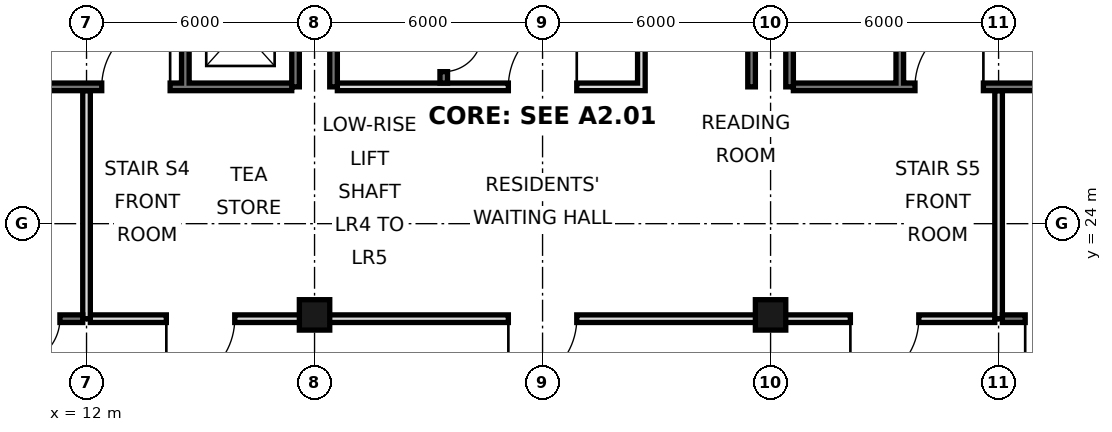
"""IFC4 building model, lengths in metres.
Left out: names, types, materials, properties, quantities, classifications, styles, units other than length and angle.
Written with IfcOpenShell. Run it as: python <this file> out.ifc"""

import sys

from ifc_helpers import new_model, si_unit, direction, frame, frame_2d, origin, origin_2d, place, context, subcontext, project, spatial, rectangle, hollow_rectangle, extrude, element, fill, save


model = new_model("IFC4")
c1 = context("Model", 3, precision=1e-05, world=origin(), true_north=direction((0.0, 1.0)))
c2 = subcontext(c1, "Body", "Model", "MODEL_VIEW")
j1 = project(units=[si_unit("LENGTHUNIT", "METRE"), si_unit("PLANEANGLEUNIT", "RADIAN")], contexts=[c1])
p1 = place(None, origin())
s1 = spatial("IfcSite", under=j1, at=p1, CompositionType="ELEMENT")
p2 = place(p1, origin())
s2 = spatial("IfcBuilding", under=s1, at=p2, CompositionType="ELEMENT")
p3 = place(p2, frame((0.0, 0.0, -13.5)))
s3 = spatial("IfcBuildingStorey", under=s2, at=p3, CompositionType="ELEMENT", Elevation=-13.5)
for number, where, z_axis, x_axis in (
    (1, (18.0, 21.6, 0.0), (0.0, 0.0, 1.0), (1.0, 0.0, 0.0)),
    (2, (30.0, 21.6, 0.0), (0.0, 0.0, 1.0), (1.0, 0.0, 0.0)),
):
    element("IfcColumn", number, at=place(p3, frame(where, z_axis=z_axis, x_axis=x_axis)), inside=s3, PredefinedType="COLUMN", context=c2, shape_type="SweptSolid", body=[
        extrude(hollow_rectangle(XDim=0.8, YDim=0.8, WallThickness=0.07, at=origin_2d()), origin(), (0.0, 0.0, 1.0), 4.5),
    ])
for number, where, z_axis, x_axis in (
    (3, (17.5, 27.6, 0.0), (0.0, 0.0, 1.0), (0.0, 1.0, 0.0)),
    (4, (18.5, 27.6, 0.0), (0.0, 0.0, 1.0), (0.0, 1.0, 0.0)),
    (5, (29.5, 27.6, 0.0), (0.0, 0.0, 1.0), (0.0, 1.0, 0.0)),
    (6, (30.5, 27.6, 0.0), (0.0, 0.0, 1.0), (0.0, 1.0, 0.0)),
):
    element("IfcWall", number, at=place(p3, frame(where, z_axis=z_axis, x_axis=x_axis)), inside=s3, PredefinedType="SOLIDWALL", context=c2, shape_type="SweptSolid", body=[
        extrude(rectangle(XDim=17.5, YDim=0.2, at=frame_2d((8.75, 0.0))), origin(), (0.0, 0.0, 1.0), 4.15),
    ])
p4 = place(p3, frame((12.1, 21.5, 0.0), z_axis=(0.0, 0.0, 1.0), x_axis=(1.0, 0.0, 0.0)))
e7 = element("IfcWall", 7, at=p4, inside=s3, PredefinedType="SOLIDWALL", context=c2, shape_type="SweptSolid", body=[
    extrude(rectangle(XDim=23.8, YDim=0.2, at=frame_2d((11.9, 0.0))), origin(), (0.0, 0.0, 1.0), 3.05),
])
p5 = place(p4, frame((2.0, 0.0, 0.0)))
e8 = element("IfcOpeningElement", 8, at=p5, cuts=e7, PredefinedType="OPENING", context=c2, shape_type="SweptSolid", body=[
    extrude(rectangle(XDim=1.8, YDim=2.1, at=frame_2d((0.9, 1.05))), frame((0.0, 0.11, 0.0), z_axis=(0.0, -1.0, 0.0), x_axis=(1.0, 0.0, 0.0)), (0.0, 0.0, 1.0), 0.22),
])
p6 = place(p4, frame((11.0, 0.0, 0.0)))
e9 = element("IfcOpeningElement", 9, at=p6, cuts=e7, PredefinedType="OPENING", context=c2, shape_type="SweptSolid", body=[
    extrude(rectangle(XDim=1.8, YDim=2.1, at=frame_2d((0.9, 1.05))), frame((0.0, 0.11, 0.0), z_axis=(0.0, -1.0, 0.0), x_axis=(1.0, 0.0, 0.0)), (0.0, 0.0, 1.0), 0.22),
])
p7 = place(p4, frame((20.0, 0.0, 0.0)))
e10 = element("IfcOpeningElement", 10, at=p7, cuts=e7, PredefinedType="OPENING", context=c2, shape_type="SweptSolid", body=[
    extrude(rectangle(XDim=1.8, YDim=2.1, at=frame_2d((0.9, 1.05))), frame((0.0, 0.11, 0.0), z_axis=(0.0, -1.0, 0.0), x_axis=(1.0, 0.0, 0.0)), (0.0, 0.0, 1.0), 0.22),
])
p8 = place(p3, frame((12.0, 21.5, 0.0), z_axis=(0.0, 0.0, 1.0), x_axis=(0.0, 1.0, 0.0)))
e11 = element("IfcWall", 11, at=p8, inside=s3, PredefinedType="PARTITIONING", context=c2, shape_type="SweptSolid", body=[
    extrude(rectangle(XDim=6.0, YDim=0.2, at=frame_2d((3.0, 0.0))), origin(), (0.0, 0.0, 1.0), 3.05),
])
p9 = place(p3, frame((14.6, 27.7, 0.0), z_axis=(0.0, 0.0, 1.0), x_axis=(0.0, 1.0, 0.0)))
e12 = element("IfcWall", 12, at=p9, inside=s3, PredefinedType="SOLIDWALL", context=c2, shape_type="SweptSolid", body=[
    extrude(rectangle(XDim=17.3, YDim=0.2, at=frame_2d((8.65, 0.0))), origin(), (0.0, 0.0, 1.0), 4.15),
])
p10 = place(p9, frame((0.9, 0.0, 0.0)))
e13 = element("IfcOpeningElement", 13, at=p10, cuts=e12, PredefinedType="OPENING", context=c2, shape_type="SweptSolid", body=[
    extrude(rectangle(XDim=1.1, YDim=2.1, at=frame_2d((0.55, 1.05))), frame((0.0, 0.11, 0.0), z_axis=(0.0, -1.0, 0.0), x_axis=(1.0, 0.0, 0.0)), (0.0, 0.0, 1.0), 0.22),
])
p11 = place(p9, frame((4.0, 0.0, 0.0)))
e14 = element("IfcOpeningElement", 14, at=p11, cuts=e12, PredefinedType="OPENING", context=c2, shape_type="SweptSolid", body=[
    extrude(rectangle(XDim=1.1, YDim=2.1, at=frame_2d((0.55, 1.05))), frame((0.0, 0.11, 0.0), z_axis=(0.0, -1.0, 0.0), x_axis=(1.0, 0.0, 0.0)), (0.0, 0.0, 1.0), 0.22),
])
p12 = place(p9, frame((15.2, 0.0, 0.0)))
e15 = element("IfcOpeningElement", 15, at=p12, cuts=e12, PredefinedType="OPENING", context=c2, shape_type="SweptSolid", body=[
    extrude(rectangle(XDim=1.1, YDim=2.1, at=frame_2d((0.55, 1.05))), frame((0.0, 0.11, 0.0), z_axis=(0.0, -1.0, 0.0), x_axis=(1.0, 0.0, 0.0)), (0.0, 0.0, 1.0), 0.22),
])
p13 = place(p3, frame((21.4, 27.7, 0.0), z_axis=(0.0, 0.0, 1.0), x_axis=(0.0, 1.0, 0.0)))
e16 = element("IfcWall", 16, at=p13, inside=s3, PredefinedType="SOLIDWALL", context=c2, shape_type="SweptSolid", body=[
    extrude(rectangle(XDim=17.3, YDim=0.2, at=frame_2d((8.65, 0.0))), origin(), (0.0, 0.0, 1.0), 4.15),
])
p14 = place(p13, frame((0.3, 0.0, 0.0)))
e17 = element("IfcOpeningElement", 17, at=p14, cuts=e16, PredefinedType="OPENING", context=c2, shape_type="SweptSolid", body=[
    extrude(rectangle(XDim=1.0, YDim=2.1, at=frame_2d((0.5, 1.05))), frame((0.0, 0.11, 0.0), z_axis=(0.0, -1.0, 0.0), x_axis=(1.0, 0.0, 0.0)), (0.0, 0.0, 1.0), 0.22),
])
p15 = place(p13, frame((3.4, 0.0, 0.0)))
e18 = element("IfcOpeningElement", 18, at=p15, cuts=e16, PredefinedType="OPENING", context=c2, shape_type="SweptSolid", body=[
    extrude(rectangle(XDim=1.0, YDim=2.1, at=frame_2d((0.5, 1.05))), frame((0.0, 0.11, 0.0), z_axis=(0.0, -1.0, 0.0), x_axis=(1.0, 0.0, 0.0)), (0.0, 0.0, 1.0), 0.22),
])
p16 = place(p13, frame((16.0, 0.0, 0.0)))
e19 = element("IfcOpeningElement", 19, at=p16, cuts=e16, PredefinedType="OPENING", context=c2, shape_type="SweptSolid", body=[
    extrude(rectangle(XDim=1.0, YDim=2.1, at=frame_2d((0.5, 1.05))), frame((0.0, 0.11, 0.0), z_axis=(0.0, -1.0, 0.0), x_axis=(1.0, 0.0, 0.0)), (0.0, 0.0, 1.0), 0.22),
])
p17 = place(p3, frame((26.6, 27.5, 0.0), z_axis=(0.0, 0.0, 1.0), x_axis=(0.0, 1.0, 0.0)))
e20 = element("IfcWall", 20, at=p17, inside=s3, PredefinedType="PARTITIONING", context=c2, shape_type="SweptSolid", body=[
    extrude(rectangle(XDim=17.5, YDim=0.2, at=frame_2d((8.75, 0.0))), origin(), (0.0, 0.0, 1.0), 4.15),
])
p18 = place(p17, frame((10.35, 0.0, 0.0)))
e21 = element("IfcOpeningElement", 21, at=p18, cuts=e20, PredefinedType="OPENING", context=c2, shape_type="SweptSolid", body=[
    extrude(rectangle(XDim=1.0, YDim=2.1, at=frame_2d((0.5, 1.05))), frame((0.0, 0.11, 0.0), z_axis=(0.0, -1.0, 0.0), x_axis=(1.0, 0.0, 0.0)), (0.0, 0.0, 1.0), 0.22),
])
p19 = place(p17, frame((14.575, 0.0, 0.0)))
e22 = element("IfcOpeningElement", 22, at=p19, cuts=e20, PredefinedType="OPENING", context=c2, shape_type="SweptSolid", body=[
    extrude(rectangle(XDim=1.0, YDim=2.1, at=frame_2d((0.5, 1.05))), frame((0.0, 0.11, 0.0), z_axis=(0.0, -1.0, 0.0), x_axis=(1.0, 0.0, 0.0)), (0.0, 0.0, 1.0), 0.22),
])
p20 = place(p3, frame((33.4, 27.7, 0.0), z_axis=(0.0, 0.0, 1.0), x_axis=(0.0, 1.0, 0.0)))
e23 = element("IfcWall", 23, at=p20, inside=s3, PredefinedType="SOLIDWALL", context=c2, shape_type="SweptSolid", body=[
    extrude(rectangle(XDim=17.3, YDim=0.2, at=frame_2d((8.65, 0.0))), origin(), (0.0, 0.0, 1.0), 3.05),
])
p21 = place(p20, frame((15.2, 0.0, 0.0)))
e24 = element("IfcOpeningElement", 24, at=p21, cuts=e23, PredefinedType="OPENING", context=c2, shape_type="SweptSolid", body=[
    extrude(rectangle(XDim=1.1, YDim=2.1, at=frame_2d((0.55, 1.05))), frame((0.0, 0.11, 0.0), z_axis=(0.0, -1.0, 0.0), x_axis=(1.0, 0.0, 0.0)), (0.0, 0.0, 1.0), 0.22),
])
p22 = place(p20, frame((2.5, 0.0, 0.0)))
e25 = element("IfcOpeningElement", 25, at=p22, cuts=e23, PredefinedType="OPENING", context=c2, shape_type="SweptSolid", body=[
    extrude(rectangle(XDim=1.0, YDim=2.1, at=frame_2d((0.5, 1.05))), frame((0.0, 0.11, 0.0), z_axis=(0.0, -1.0, 0.0), x_axis=(1.0, 0.0, 0.0)), (0.0, 0.0, 1.0), 0.22),
])
p23 = place(p3, frame((36.0, 21.5, 0.0), z_axis=(0.0, 0.0, 1.0), x_axis=(0.0, 1.0, 0.0)))
e26 = element("IfcWall", 26, at=p23, inside=s3, PredefinedType="PARTITIONING", context=c2, shape_type="SweptSolid", body=[
    extrude(rectangle(XDim=6.0, YDim=0.2, at=frame_2d((3.0, 0.0))), origin(), (0.0, 0.0, 1.0), 3.05),
])
p24 = place(p3, frame((36.1, 21.5, 0.0), z_axis=(0.0, 0.0, 1.0), x_axis=(1.0, 0.0, 0.0)))
e27 = element("IfcWall", 27, at=p24, inside=s3, PredefinedType="SOLIDWALL", context=c2, shape_type="SweptSolid", body=[
    extrude(rectangle(XDim=5.3, YDim=0.2, at=frame_2d((2.65, 0.0))), origin(), (0.0, 0.0, 1.0), 3.05),
])
p25 = place(p24, frame((0.6, 0.0, 0.0)))
e28 = element("IfcOpeningElement", 28, at=p25, cuts=e27, PredefinedType="OPENING", context=c2, shape_type="SweptSolid", body=[
    extrude(rectangle(XDim=1.2, YDim=2.1, at=frame_2d((0.6, 1.05))), frame((0.0, 0.11, 0.0), z_axis=(0.0, -1.0, 0.0), x_axis=(1.0, 0.0, 0.0)), (0.0, 0.0, 1.0), 0.22),
])
p26 = place(p3, frame((6.6, 21.5, 0.0), z_axis=(0.0, 0.0, 1.0), x_axis=(1.0, 0.0, 0.0)))
e29 = element("IfcWall", 29, at=p26, inside=s3, PredefinedType="SOLIDWALL", context=c2, shape_type="SweptSolid", body=[
    extrude(rectangle(XDim=5.3, YDim=0.2, at=frame_2d((2.65, 0.0))), origin(), (0.0, 0.0, 1.0), 3.05),
])
p27 = place(p26, frame((3.5, 0.0, 0.0)))
e30 = element("IfcOpeningElement", 30, at=p27, cuts=e29, PredefinedType="OPENING", context=c2, shape_type="SweptSolid", body=[
    extrude(rectangle(XDim=1.2, YDim=2.1, at=frame_2d((0.6, 1.05))), frame((0.0, 0.11, 0.0), z_axis=(0.0, -1.0, 0.0), x_axis=(1.0, 0.0, 0.0)), (0.0, 0.0, 1.0), 0.22),
])
p28 = place(p3, frame((18.6, 27.6, 0.0), z_axis=(0.0, 0.0, 1.0), x_axis=(1.0, 0.0, 0.0)))
e31 = element("IfcWall", 31, at=p28, inside=s3, PredefinedType="PARTITIONING", context=c2, shape_type="SweptSolid", body=[
    extrude(rectangle(XDim=7.9, YDim=0.2, at=frame_2d((3.95, 0.0))), origin(), (0.0, 0.0, 1.0), 4.15),
])
p29 = place(p28, frame((4.5, 0.0, 0.0)))
e32 = element("IfcOpeningElement", 32, at=p29, cuts=e31, PredefinedType="OPENING", context=c2, shape_type="SweptSolid", body=[
    extrude(rectangle(XDim=1.8, YDim=2.1, at=frame_2d((0.9, 1.05))), frame((0.0, 0.11, 0.0), z_axis=(0.0, -1.0, 0.0), x_axis=(1.0, 0.0, 0.0)), (0.0, 0.0, 1.0), 0.22),
])
p30 = place(p3, frame((30.6, 27.6, 0.0), z_axis=(0.0, 0.0, 1.0), x_axis=(1.0, 0.0, 0.0)))
e33 = element("IfcWall", 33, at=p30, inside=s3, PredefinedType="SOLIDWALL", context=c2, shape_type="SweptSolid", body=[
    extrude(rectangle(XDim=10.8, YDim=0.2, at=frame_2d((5.4, 0.0))), origin(), (0.0, 0.0, 1.0), 4.15),
])
p31 = place(p30, frame((3.2, 0.0, 0.0)))
e34 = element("IfcOpeningElement", 34, at=p31, cuts=e33, PredefinedType="OPENING", context=c2, shape_type="SweptSolid", body=[
    extrude(rectangle(XDim=1.8, YDim=2.1, at=frame_2d((0.9, 1.05))), frame((0.0, 0.11, 0.0), z_axis=(0.0, -1.0, 0.0), x_axis=(1.0, 0.0, 0.0)), (0.0, 0.0, 1.0), 0.22),
])
p32 = place(p3, frame((6.6, 27.6, 0.0), z_axis=(0.0, 0.0, 1.0), x_axis=(1.0, 0.0, 0.0)))
e35 = element("IfcWall", 35, at=p32, inside=s3, PredefinedType="SOLIDWALL", context=c2, shape_type="SweptSolid", body=[
    extrude(rectangle(XDim=10.8, YDim=0.2, at=frame_2d((5.4, 0.0))), origin(), (0.0, 0.0, 1.0), 4.15),
])
p33 = place(p32, frame((5.8, 0.0, 0.0)))
e36 = element("IfcOpeningElement", 36, at=p33, cuts=e35, PredefinedType="OPENING", context=c2, shape_type="SweptSolid", body=[
    extrude(rectangle(XDim=1.8, YDim=2.1, at=frame_2d((0.9, 1.05))), frame((0.0, 0.11, 0.0), z_axis=(0.0, -1.0, 0.0), x_axis=(1.0, 0.0, 0.0)), (0.0, 0.0, 1.0), 0.22),
])
p34 = place(p5, frame((1.8, 0.0, 0.0), z_axis=(0.0, 0.0, 1.0), x_axis=(-1.0, 0.0, 0.0)))
e37 = element("IfcDoor", 37, at=p34, inside=s3, OperationType="SINGLE_SWING_RIGHT", PredefinedType="DOOR", context=c2, shape_type="SweptSolid", body=[
    extrude(rectangle(XDim=1.8, YDim=2.1, at=frame_2d((0.9, 1.05))), frame((0.0, 0.025, 0.0), z_axis=(0.0, -1.0, 0.0), x_axis=(1.0, 0.0, 0.0)), (0.0, 0.0, 1.0), 0.05),
])
fill(e8, e37)
p35 = place(p6, frame((1.8, 0.0, 0.0), z_axis=(0.0, 0.0, 1.0), x_axis=(-1.0, 0.0, 0.0)))
e38 = element("IfcDoor", 38, at=p35, inside=s3, OperationType="SINGLE_SWING_RIGHT", PredefinedType="DOOR", context=c2, shape_type="SweptSolid", body=[
    extrude(rectangle(XDim=1.8, YDim=2.1, at=frame_2d((0.9, 1.05))), frame((0.0, 0.025, 0.0), z_axis=(0.0, -1.0, 0.0), x_axis=(1.0, 0.0, 0.0)), (0.0, 0.0, 1.0), 0.05),
])
fill(e9, e38)
p36 = place(p7, frame((1.8, 0.0, 0.0), z_axis=(0.0, 0.0, 1.0), x_axis=(-1.0, 0.0, 0.0)))
e39 = element("IfcDoor", 39, at=p36, inside=s3, OperationType="SINGLE_SWING_RIGHT", PredefinedType="DOOR", context=c2, shape_type="SweptSolid", body=[
    extrude(rectangle(XDim=1.8, YDim=2.1, at=frame_2d((0.9, 1.05))), frame((0.0, 0.025, 0.0), z_axis=(0.0, -1.0, 0.0), x_axis=(1.0, 0.0, 0.0)), (0.0, 0.0, 1.0), 0.05),
])
fill(e10, e39)
p37 = place(p27, frame((1.2, 0.0, 0.0), z_axis=(0.0, 0.0, 1.0), x_axis=(-1.0, 0.0, 0.0)))
e40 = element("IfcDoor", 40, at=p37, inside=s3, OperationType="SINGLE_SWING_RIGHT", PredefinedType="DOOR", context=c2, shape_type="SweptSolid", body=[
    extrude(rectangle(XDim=1.2, YDim=2.1, at=frame_2d((0.6, 1.05))), frame((0.0, 0.025, 0.0), z_axis=(0.0, -1.0, 0.0), x_axis=(1.0, 0.0, 0.0)), (0.0, 0.0, 1.0), 0.05),
])
fill(e30, e40)
p38 = place(p25, frame((1.2, 0.0, 0.0), z_axis=(0.0, 0.0, 1.0), x_axis=(-1.0, 0.0, 0.0)))
e41 = element("IfcDoor", 41, at=p38, inside=s3, OperationType="SINGLE_SWING_RIGHT", PredefinedType="DOOR", context=c2, shape_type="SweptSolid", body=[
    extrude(rectangle(XDim=1.2, YDim=2.1, at=frame_2d((0.6, 1.05))), frame((0.0, 0.025, 0.0), z_axis=(0.0, -1.0, 0.0), x_axis=(1.0, 0.0, 0.0)), (0.0, 0.0, 1.0), 0.05),
])
fill(e28, e41)
p39 = place(p33, frame((1.8, 0.0, 0.0), z_axis=(0.0, 0.0, 1.0), x_axis=(-1.0, 0.0, 0.0)))
e42 = element("IfcDoor", 42, at=p39, inside=s3, OperationType="SINGLE_SWING_LEFT", PredefinedType="DOOR", context=c2, shape_type="SweptSolid", body=[
    extrude(rectangle(XDim=1.8, YDim=2.1, at=frame_2d((0.9, 1.05))), frame((0.0, 0.025, 0.0), z_axis=(0.0, -1.0, 0.0), x_axis=(1.0, 0.0, 0.0)), (0.0, 0.0, 1.0), 0.05),
])
fill(e36, e42)
p40 = place(p29, frame((1.8, 0.0, 0.0), z_axis=(0.0, 0.0, 1.0), x_axis=(-1.0, 0.0, 0.0)))
e43 = element("IfcDoor", 43, at=p40, inside=s3, OperationType="SINGLE_SWING_LEFT", PredefinedType="DOOR", context=c2, shape_type="SweptSolid", body=[
    extrude(rectangle(XDim=1.8, YDim=2.1, at=frame_2d((0.9, 1.05))), frame((0.0, 0.025, 0.0), z_axis=(0.0, -1.0, 0.0), x_axis=(1.0, 0.0, 0.0)), (0.0, 0.0, 1.0), 0.05),
])
fill(e32, e43)
p41 = place(p31, frame((1.8, 0.0, 0.0), z_axis=(0.0, 0.0, 1.0), x_axis=(-1.0, 0.0, 0.0)))
e44 = element("IfcDoor", 44, at=p41, inside=s3, OperationType="SINGLE_SWING_LEFT", PredefinedType="DOOR", context=c2, shape_type="SweptSolid", body=[
    extrude(rectangle(XDim=1.8, YDim=2.1, at=frame_2d((0.9, 1.05))), frame((0.0, 0.025, 0.0), z_axis=(0.0, -1.0, 0.0), x_axis=(1.0, 0.0, 0.0)), (0.0, 0.0, 1.0), 0.05),
])
fill(e34, e44)
p42 = place(p14, origin())
e45 = element("IfcDoor", 45, at=p42, inside=s3, OperationType="SINGLE_SWING_RIGHT", PredefinedType="DOOR", context=c2, shape_type="SweptSolid", body=[
    extrude(rectangle(XDim=1.0, YDim=2.1, at=frame_2d((0.5, 1.05))), frame((0.0, 0.025, 0.0), z_axis=(0.0, -1.0, 0.0), x_axis=(1.0, 0.0, 0.0)), (0.0, 0.0, 1.0), 0.05),
])
fill(e17, e45)
save(model, sys.argv[1])
